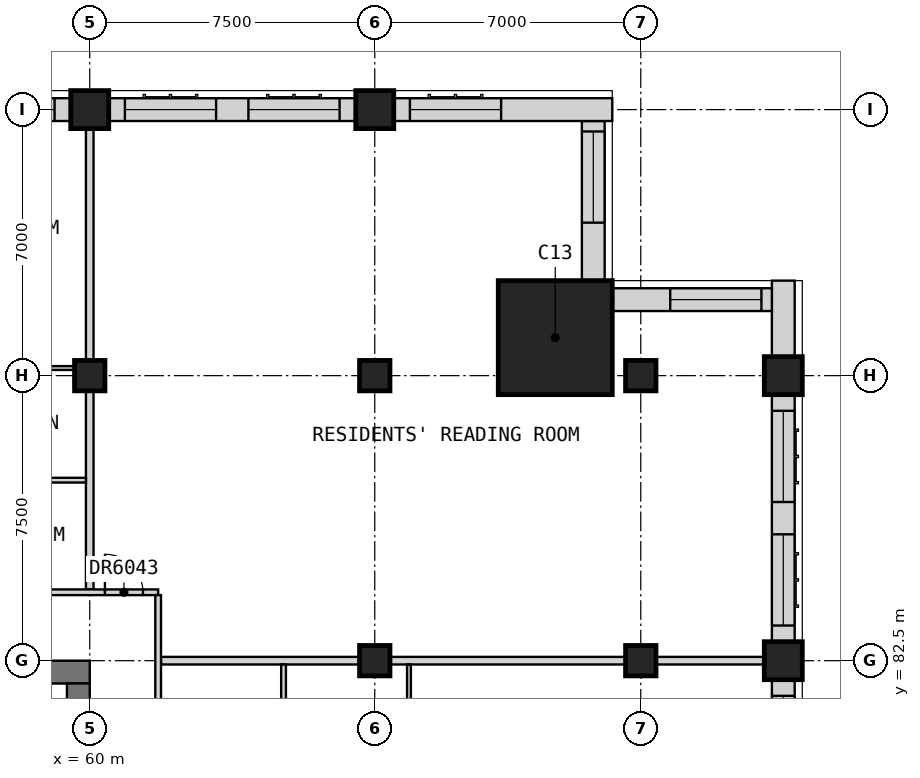
"""IFC4 building model, lengths in metres.
Left out: names, types, materials, properties, quantities, classifications, styles, units other than length and angle.
Written with IfcOpenShell. Run it as: python <this file> out.ifc"""

import sys

from ifc_helpers import new_model, si_unit, direction, frame, frame_2d, origin, origin_2d, place, context, subcontext, project, spatial, rectangle, extrude, element, fill, save


model = new_model("IFC4")
c1 = context("Model", 3, precision=1e-05, world=origin(), true_north=direction((0.0, 1.0)))
c2 = subcontext(c1, "Body", "Model", "MODEL_VIEW")
j1 = project(units=[si_unit("LENGTHUNIT", "METRE"), si_unit("PLANEANGLEUNIT", "RADIAN")], contexts=[c1])
p1 = place(None, origin())
s1 = spatial("IfcSite", under=j1, at=p1, CompositionType="ELEMENT")
p2 = place(p1, origin())
s2 = spatial("IfcBuilding", under=s1, at=p2, CompositionType="ELEMENT")
p3 = place(p2, frame((0.0, 0.0, 254.7)))
s3 = spatial("IfcBuildingStorey", under=s2, at=p3, CompositionType="ELEMENT", Elevation=254.7)
for number, where, z_axis, x_axis in (
    (1, (78.25, 82.5, 0.0), (0.0, 0.0, 1.0), (1.0, 0.0, 0.0)),
    (2, (78.25, 90.0, 0.0), (0.0, 0.0, 1.0), (1.0, 0.0, 0.0)),
):
    element("IfcColumn", number, at=place(p3, frame(where, z_axis=z_axis, x_axis=x_axis)), inside=s3, PredefinedType="COLUMN", context=c2, shape_type="SweptSolid", body=[
        extrude(rectangle(XDim=1.0, YDim=1.0, at=origin_2d()), origin(), (0.0, 0.0, 1.0), 3.5),
    ])
p4 = place(p3, frame((60.0, 90.0, 0.0), z_axis=(0.0, 0.0, 1.0), x_axis=(1.0, 0.0, 0.0)))
e3 = element("IfcColumn", 3, at=p4, inside=s3, PredefinedType="COLUMN", context=c2, shape_type="SweptSolid", body=[
    extrude(rectangle(XDim=0.8, YDim=0.8, at=origin_2d()), origin(), (0.0, 0.0, 1.0), 3.5),
])
p5 = place(p3, frame((60.0, 97.0, 0.0), z_axis=(0.0, 0.0, 1.0), x_axis=(1.0, 0.0, 0.0)))
e4 = element("IfcColumn", 4, at=p5, inside=s3, PredefinedType="COLUMN", context=c2, shape_type="SweptSolid", body=[
    extrude(rectangle(XDim=1.0, YDim=1.0, at=origin_2d()), origin(), (0.0, 0.0, 1.0), 3.5),
])
for number, where, z_axis, x_axis in (
    (5, (67.5, 82.5, 0.0), (0.0, 0.0, 1.0), (1.0, 0.0, 0.0)),
    (6, (67.5, 90.0, 0.0), (0.0, 0.0, 1.0), (1.0, 0.0, 0.0)),
):
    element("IfcColumn", number, at=place(p3, frame(where, z_axis=z_axis, x_axis=x_axis)), inside=s3, PredefinedType="COLUMN", context=c2, shape_type="SweptSolid", body=[
        extrude(rectangle(XDim=0.8, YDim=0.8, at=origin_2d()), origin(), (0.0, 0.0, 1.0), 3.5),
    ])
p6 = place(p3, frame((67.5, 97.0, 0.0), z_axis=(0.0, 0.0, 1.0), x_axis=(1.0, 0.0, 0.0)))
e7 = element("IfcColumn", 7, at=p6, inside=s3, PredefinedType="COLUMN", context=c2, shape_type="SweptSolid", body=[
    extrude(rectangle(XDim=1.0, YDim=1.0, at=origin_2d()), origin(), (0.0, 0.0, 1.0), 3.5),
])
for number, where, z_axis, x_axis in (
    (8, (74.5, 82.5, 0.0), (0.0, 0.0, 1.0), (1.0, 0.0, 0.0)),
    (9, (74.5, 90.0, 0.0), (0.0, 0.0, 1.0), (1.0, 0.0, 0.0)),
):
    element("IfcColumn", number, at=place(p3, frame(where, z_axis=z_axis, x_axis=x_axis)), inside=s3, PredefinedType="COLUMN", context=c2, shape_type="SweptSolid", body=[
        extrude(rectangle(XDim=0.8, YDim=0.8, at=origin_2d()), origin(), (0.0, 0.0, 1.0), 3.5),
    ])
p7 = place(p3, frame((72.25, 91.0, 0.0), z_axis=(0.0, 0.0, 1.0), x_axis=(1.0, 0.0, 0.0)))
e10 = element("IfcColumn", 10, at=p7, inside=s3, PredefinedType="COLUMN", context=c2, shape_type="SweptSolid", body=[
    extrude(rectangle(XDim=3.0, YDim=3.0, at=origin_2d()), origin(), (0.0, 0.0, 1.0), 3.5),
])
p8 = place(p3, frame((30.0, 82.2, 0.0), z_axis=(0.0, 0.0, 1.0), x_axis=(1.0, 0.0, 0.0)))
e11 = element("IfcWall", 11, at=p8, inside=s3, PredefinedType="SHEAR", context=c2, shape_type="SweptSolid", body=[
    extrude(rectangle(XDim=30.0, YDim=0.6, at=frame_2d((15.0, 0.0))), origin(), (0.0, 0.0, 1.0), 3.5),
])
p9 = place(p3, frame((59.7, 60.6, 0.0), z_axis=(0.0, 0.0, 1.0), x_axis=(0.0, 1.0, 0.0)))
e12 = element("IfcWall", 12, at=p9, inside=s3, PredefinedType="SHEAR", context=c2, shape_type="SweptSolid", body=[
    extrude(rectangle(XDim=21.3, YDim=0.6, at=frame_2d((10.65, 0.0))), origin(), (0.0, 0.0, 1.0), 3.5),
])
p10 = place(p9, frame((14.9, 0.0, 0.0)))
e13 = element("IfcOpeningElement", 13, at=p10, cuts=e12, PredefinedType="OPENING", context=c2, shape_type="SweptSolid", body=[
    extrude(rectangle(XDim=1.8, YDim=2.1, at=frame_2d((0.9, 1.05))), frame((0.0, 0.31, 0.0), z_axis=(0.0, -1.0, 0.0), x_axis=(1.0, 0.0, 0.0)), (0.0, 0.0, 1.0), 0.62),
])
p11 = place(p3, frame((78.25, 75.5, 0.0), z_axis=(0.0, 0.0, 1.0), x_axis=(0.0, 1.0, 0.0)))
e14 = element("IfcWall", 14, at=p11, inside=s3, PredefinedType="SOLIDWALL", context=c2, shape_type="SweptSolid", body=[
    extrude(rectangle(XDim=6.5, YDim=0.6, at=frame_2d((3.25, 0.0))), origin(), (0.0, 0.0, 1.0), 2.75),
])
p12 = place(p11, frame((0.425, 0.0, 0.8)))
e15 = element("IfcOpeningElement", 15, at=p12, cuts=e14, PredefinedType="OPENING", context=c2, shape_type="SweptSolid", body=[
    extrude(rectangle(XDim=2.4, YDim=1.8, at=frame_2d((1.2, 0.9))), frame((0.0, 0.31, 0.0), z_axis=(0.0, -1.0, 0.0), x_axis=(1.0, 0.0, 0.0)), (0.0, 0.0, 1.0), 0.62),
])
p13 = place(p11, frame((3.675, 0.0, 0.8)))
e16 = element("IfcOpeningElement", 16, at=p13, cuts=e14, PredefinedType="OPENING", context=c2, shape_type="SweptSolid", body=[
    extrude(rectangle(XDim=2.4, YDim=1.8, at=frame_2d((1.2, 0.9))), frame((0.0, 0.31, 0.0), z_axis=(0.0, -1.0, 0.0), x_axis=(1.0, 0.0, 0.0)), (0.0, 0.0, 1.0), 0.62),
])
p14 = place(p3, frame((78.25, 83.0, 0.0), z_axis=(0.0, 0.0, 1.0), x_axis=(0.0, 1.0, 0.0)))
e17 = element("IfcWall", 17, at=p14, inside=s3, PredefinedType="SOLIDWALL", context=c2, shape_type="SweptSolid", body=[
    extrude(rectangle(XDim=6.5, YDim=0.6, at=frame_2d((3.25, 0.0))), origin(), (0.0, 0.0, 1.0), 2.75),
])
p15 = place(p14, frame((0.425, 0.0, 0.8)))
e18 = element("IfcOpeningElement", 18, at=p15, cuts=e17, PredefinedType="OPENING", context=c2, shape_type="SweptSolid", body=[
    extrude(rectangle(XDim=2.4, YDim=1.8, at=frame_2d((1.2, 0.9))), frame((0.0, 0.31, 0.0), z_axis=(0.0, -1.0, 0.0), x_axis=(1.0, 0.0, 0.0)), (0.0, 0.0, 1.0), 0.62),
])
p16 = place(p14, frame((3.675, 0.0, 0.8)))
e19 = element("IfcOpeningElement", 19, at=p16, cuts=e17, PredefinedType="OPENING", context=c2, shape_type="SweptSolid", body=[
    extrude(rectangle(XDim=2.4, YDim=1.8, at=frame_2d((1.2, 0.9))), frame((0.0, 0.31, 0.0), z_axis=(0.0, -1.0, 0.0), x_axis=(1.0, 0.0, 0.0)), (0.0, 0.0, 1.0), 0.62),
])
p17 = place(p3, frame((78.25, 90.5, 0.0), z_axis=(0.0, 0.0, 1.0), x_axis=(0.0, 1.0, 0.0)))
e20 = element("IfcWall", 20, at=p17, inside=s3, PredefinedType="SOLIDWALL", context=c2, shape_type="SweptSolid", body=[
    extrude(rectangle(XDim=2.0, YDim=0.6, at=frame_2d((1.0, 0.0))), origin(), (0.0, 0.0, 1.0), 3.1),
])
p18 = place(p3, frame((77.95, 92.0, 0.0), z_axis=(0.0, 0.0, 1.0), x_axis=(-1.0, 0.0, 0.0)))
e21 = element("IfcWall", 21, at=p18, inside=s3, PredefinedType="SOLIDWALL", context=c2, shape_type="SweptSolid", body=[
    extrude(rectangle(XDim=4.2, YDim=0.6, at=frame_2d((2.1, 0.0))), origin(), (0.0, 0.0, 1.0), 3.1),
])
p19 = place(p18, frame((0.275, 0.0, 0.8)))
e22 = element("IfcOpeningElement", 22, at=p19, cuts=e21, PredefinedType="OPENING", context=c2, shape_type="SweptSolid", body=[
    extrude(rectangle(XDim=2.4, YDim=1.8, at=frame_2d((1.2, 0.9))), frame((0.0, 0.31, 0.0), z_axis=(0.0, -1.0, 0.0), x_axis=(1.0, 0.0, 0.0)), (0.0, 0.0, 1.0), 0.62),
])
p20 = place(p3, frame((73.25, 92.5, 0.0), z_axis=(0.0, 0.0, 1.0), x_axis=(0.0, 1.0, 0.0)))
e23 = element("IfcWall", 23, at=p20, inside=s3, PredefinedType="SOLIDWALL", context=c2, shape_type="SweptSolid", body=[
    extrude(rectangle(XDim=4.2, YDim=0.6, at=frame_2d((2.1, 0.0))), origin(), (0.0, 0.0, 1.0), 3.1),
])
p21 = place(p20, frame((1.525, 0.0, 0.8)))
e24 = element("IfcOpeningElement", 24, at=p21, cuts=e23, PredefinedType="OPENING", context=c2, shape_type="SweptSolid", body=[
    extrude(rectangle(XDim=2.4, YDim=1.8, at=frame_2d((1.2, 0.9))), frame((0.0, 0.31, 0.0), z_axis=(0.0, -1.0, 0.0), x_axis=(1.0, 0.0, 0.0)), (0.0, 0.0, 1.0), 0.62),
])
p22 = place(p3, frame((73.75, 97.0, 0.0), z_axis=(0.0, 0.0, 1.0), x_axis=(-1.0, 0.0, 0.0)))
e25 = element("IfcWall", 25, at=p22, inside=s3, PredefinedType="SOLIDWALL", context=c2, shape_type="SweptSolid", body=[
    extrude(rectangle(XDim=5.75, YDim=0.6, at=frame_2d((2.875, 0.0))), origin(), (0.0, 0.0, 1.0), 3.1),
])
p23 = place(p22, frame((2.925, 0.0, 0.8)))
e26 = element("IfcOpeningElement", 26, at=p23, cuts=e25, PredefinedType="OPENING", context=c2, shape_type="SweptSolid", body=[
    extrude(rectangle(XDim=2.4, YDim=1.8, at=frame_2d((1.2, 0.9))), frame((0.0, 0.31, 0.0), z_axis=(0.0, -1.0, 0.0), x_axis=(1.0, 0.0, 0.0)), (0.0, 0.0, 1.0), 0.62),
])
p24 = place(p3, frame((67.0, 97.0, 0.0), z_axis=(0.0, 0.0, 1.0), x_axis=(-1.0, 0.0, 0.0)))
e27 = element("IfcWall", 27, at=p24, inside=s3, PredefinedType="SOLIDWALL", context=c2, shape_type="SweptSolid", body=[
    extrude(rectangle(XDim=6.5, YDim=0.6, at=frame_2d((3.25, 0.0))), origin(), (0.0, 0.0, 1.0), 2.75),
])
p25 = place(p24, frame((3.675, 0.0, 0.8)))
e28 = element("IfcOpeningElement", 28, at=p25, cuts=e27, PredefinedType="OPENING", context=c2, shape_type="SweptSolid", body=[
    extrude(rectangle(XDim=2.4, YDim=1.8, at=frame_2d((1.2, 0.9))), frame((0.0, 0.31, 0.0), z_axis=(0.0, -1.0, 0.0), x_axis=(1.0, 0.0, 0.0)), (0.0, 0.0, 1.0), 0.62),
])
p26 = place(p24, frame((0.425, 0.0, 0.8)))
e29 = element("IfcOpeningElement", 29, at=p26, cuts=e27, PredefinedType="OPENING", context=c2, shape_type="SweptSolid", body=[
    extrude(rectangle(XDim=2.4, YDim=1.8, at=frame_2d((1.2, 0.9))), frame((0.0, 0.31, 0.0), z_axis=(0.0, -1.0, 0.0), x_axis=(1.0, 0.0, 0.0)), (0.0, 0.0, 1.0), 0.62),
])
p27 = place(p3, frame((59.5, 97.0, 0.0), z_axis=(0.0, 0.0, 1.0), x_axis=(-1.0, 0.0, 0.0)))
e30 = element("IfcWall", 30, at=p27, inside=s3, PredefinedType="SOLIDWALL", context=c2, shape_type="SweptSolid", body=[
    extrude(rectangle(XDim=6.5, YDim=0.6, at=frame_2d((3.25, 0.0))), origin(), (0.0, 0.0, 1.0), 2.75),
])
p28 = place(p27, frame((3.675, 0.0, 0.8)))
e31 = element("IfcOpeningElement", 31, at=p28, cuts=e30, PredefinedType="OPENING", context=c2, shape_type="SweptSolid", body=[
    extrude(rectangle(XDim=2.4, YDim=1.8, at=frame_2d((1.2, 0.9))), frame((0.0, 0.31, 0.0), z_axis=(0.0, -1.0, 0.0), x_axis=(1.0, 0.0, 0.0)), (0.0, 0.0, 1.0), 0.62),
])
p29 = place(p27, frame((0.425, 0.0, 0.8)))
e32 = element("IfcOpeningElement", 32, at=p29, cuts=e30, PredefinedType="OPENING", context=c2, shape_type="SweptSolid", body=[
    extrude(rectangle(XDim=2.4, YDim=1.8, at=frame_2d((1.2, 0.9))), frame((0.0, 0.31, 0.0), z_axis=(0.0, -1.0, 0.0), x_axis=(1.0, 0.0, 0.0)), (0.0, 0.0, 1.0), 0.62),
])
p30 = place(p3, frame((61.875, 82.5, 0.0), z_axis=(0.0, 0.0, 1.0), x_axis=(1.0, 0.0, 0.0)))
e33 = element("IfcWall", 33, at=p30, inside=s3, PredefinedType="PARTITIONING", context=c2, shape_type="SweptSolid", body=[
    extrude(rectangle(XDim=16.875, YDim=0.2, at=frame_2d((8.438, 0.0))), origin(), (0.0, 0.0, 1.0), 3.1),
])
p31 = place(p3, frame((60.0, 84.375, 0.0), z_axis=(0.0, 0.0, 1.0), x_axis=(0.0, 1.0, 0.0)))
e34 = element("IfcWall", 34, at=p31, inside=s3, PredefinedType="PARTITIONING", context=c2, shape_type="SweptSolid", body=[
    extrude(rectangle(XDim=13.125, YDim=0.2, at=frame_2d((6.562, 0.0))), origin(), (0.0, 0.0, 1.0), 3.1),
])
p32 = place(p3, frame((33.75, 84.3, 0.0), z_axis=(0.0, 0.0, 1.0), x_axis=(1.0, 0.0, 0.0)))
e35 = element("IfcWall", 35, at=p32, inside=s3, PredefinedType="PARTITIONING", context=c2, shape_type="SweptSolid", body=[
    extrude(rectangle(XDim=28.05, YDim=0.15, at=frame_2d((14.025, 0.0))), origin(), (0.0, 0.0, 1.0), 3.1),
])
p33 = place(p32, frame((12.675, 0.0, 0.0)))
e36 = element("IfcOpeningElement", 36, at=p33, cuts=e35, PredefinedType="OPENING", context=c2, shape_type="SweptSolid", body=[
    extrude(rectangle(XDim=0.9, YDim=2.1, at=frame_2d((0.45, 1.05))), frame((0.0, 0.085, 0.0), z_axis=(0.0, -1.0, 0.0), x_axis=(1.0, 0.0, 0.0)), (0.0, 0.0, 1.0), 0.17),
])
p34 = place(p32, frame((20.175, 0.0, 0.0)))
e37 = element("IfcOpeningElement", 37, at=p34, cuts=e35, PredefinedType="OPENING", context=c2, shape_type="SweptSolid", body=[
    extrude(rectangle(XDim=0.9, YDim=2.1, at=frame_2d((0.45, 1.05))), frame((0.0, 0.085, 0.0), z_axis=(0.0, -1.0, 0.0), x_axis=(1.0, 0.0, 0.0)), (0.0, 0.0, 1.0), 0.17),
])
p35 = place(p32, frame((26.65, 0.0, 0.0)))
e38 = element("IfcOpeningElement", 38, at=p35, cuts=e35, PredefinedType="OPENING", context=c2, shape_type="SweptSolid", body=[
    extrude(rectangle(XDim=1.0, YDim=2.1, at=frame_2d((0.5, 1.05))), frame((0.0, 0.085, 0.0), z_axis=(0.0, -1.0, 0.0), x_axis=(1.0, 0.0, 0.0)), (0.0, 0.0, 1.0), 0.17),
])
p36 = place(p3, frame((61.8, 58.275, 0.0), z_axis=(0.0, 0.0, 1.0), x_axis=(0.0, 1.0, 0.0)))
e39 = element("IfcWall", 39, at=p36, inside=s3, PredefinedType="PARTITIONING", context=c2, shape_type="SweptSolid", body=[
    extrude(rectangle(XDim=25.95, YDim=0.15, at=frame_2d((12.975, 0.0))), origin(), (0.0, 0.0, 1.0), 3.1),
])
p37 = place(p36, frame((4.575, 0.0, 0.0)))
e40 = element("IfcOpeningElement", 40, at=p37, cuts=e39, PredefinedType="OPENING", context=c2, shape_type="SweptSolid", body=[
    extrude(rectangle(XDim=1.8, YDim=2.1, at=frame_2d((0.9, 1.05))), frame((0.0, 0.085, 0.0), z_axis=(0.0, -1.0, 0.0), x_axis=(1.0, 0.0, 0.0)), (0.0, 0.0, 1.0), 0.17),
])
p38 = place(p36, frame((10.65, 0.0, 0.0)))
e41 = element("IfcOpeningElement", 41, at=p38, cuts=e39, PredefinedType="OPENING", context=c2, shape_type="SweptSolid", body=[
    extrude(rectangle(XDim=0.9, YDim=2.1, at=frame_2d((0.45, 1.05))), frame((0.0, 0.085, 0.0), z_axis=(0.0, -1.0, 0.0), x_axis=(1.0, 0.0, 0.0)), (0.0, 0.0, 1.0), 0.17),
])
p39 = place(p36, frame((18.15, 0.0, 0.0)))
e42 = element("IfcOpeningElement", 42, at=p39, cuts=e39, PredefinedType="OPENING", context=c2, shape_type="SweptSolid", body=[
    extrude(rectangle(XDim=0.9, YDim=2.1, at=frame_2d((0.45, 1.05))), frame((0.0, 0.085, 0.0), z_axis=(0.0, -1.0, 0.0), x_axis=(1.0, 0.0, 0.0)), (0.0, 0.0, 1.0), 0.17),
])
p40 = place(p3, frame((30.0, 90.2, 0.0), z_axis=(0.0, 0.0, 1.0), x_axis=(1.0, 0.0, 0.0)))
e43 = element("IfcWall", 43, at=p40, inside=s3, PredefinedType="PARTITIONING", context=c2, shape_type="SweptSolid", body=[
    extrude(rectangle(XDim=29.9, YDim=0.1, at=frame_2d((14.95, 0.0))), origin(), (0.0, 0.0, 1.0), 2.75),
])
p41 = place(p40, frame((1.425, 0.0, 0.0)))
e44 = element("IfcOpeningElement", 44, at=p41, cuts=e43, PredefinedType="OPENING", context=c2, shape_type="SweptSolid", body=[
    extrude(rectangle(XDim=0.9, YDim=2.1, at=frame_2d((0.45, 1.05))), frame((0.0, 0.06, 0.0), z_axis=(0.0, -1.0, 0.0), x_axis=(1.0, 0.0, 0.0)), (0.0, 0.0, 1.0), 0.12),
])
p42 = place(p40, frame((8.925, 0.0, 0.0)))
e45 = element("IfcOpeningElement", 45, at=p42, cuts=e43, PredefinedType="OPENING", context=c2, shape_type="SweptSolid", body=[
    extrude(rectangle(XDim=0.9, YDim=2.1, at=frame_2d((0.45, 1.05))), frame((0.0, 0.06, 0.0), z_axis=(0.0, -1.0, 0.0), x_axis=(1.0, 0.0, 0.0)), (0.0, 0.0, 1.0), 0.12),
])
p43 = place(p40, frame((12.675, 0.0, 0.0)))
e46 = element("IfcOpeningElement", 46, at=p43, cuts=e43, PredefinedType="OPENING", context=c2, shape_type="SweptSolid", body=[
    extrude(rectangle(XDim=0.9, YDim=2.1, at=frame_2d((0.45, 1.05))), frame((0.0, 0.06, 0.0), z_axis=(0.0, -1.0, 0.0), x_axis=(1.0, 0.0, 0.0)), (0.0, 0.0, 1.0), 0.12),
])
p44 = place(p40, frame((16.425, 0.0, 0.0)))
e47 = element("IfcOpeningElement", 47, at=p44, cuts=e43, PredefinedType="OPENING", context=c2, shape_type="SweptSolid", body=[
    extrude(rectangle(XDim=0.9, YDim=2.1, at=frame_2d((0.45, 1.05))), frame((0.0, 0.06, 0.0), z_axis=(0.0, -1.0, 0.0), x_axis=(1.0, 0.0, 0.0)), (0.0, 0.0, 1.0), 0.12),
])
p45 = place(p40, frame((23.925, 0.0, 0.0)))
e48 = element("IfcOpeningElement", 48, at=p45, cuts=e43, PredefinedType="OPENING", context=c2, shape_type="SweptSolid", body=[
    extrude(rectangle(XDim=0.9, YDim=2.1, at=frame_2d((0.45, 1.05))), frame((0.0, 0.06, 0.0), z_axis=(0.0, -1.0, 0.0), x_axis=(1.0, 0.0, 0.0)), (0.0, 0.0, 1.0), 0.12),
])
p46 = place(p3, frame((68.4, 67.6, 0.0), z_axis=(0.0, 0.0, 1.0), x_axis=(0.0, 1.0, 0.0)))
e49 = element("IfcWall", 49, at=p46, inside=s3, PredefinedType="PARTITIONING", context=c2, shape_type="SweptSolid", body=[
    extrude(rectangle(XDim=14.8, YDim=0.1, at=frame_2d((7.4, 0.0))), origin(), (0.0, 0.0, 1.0), 3.1),
])
p47 = place(p46, frame((1.325, 0.0, 0.0)))
e50 = element("IfcOpeningElement", 50, at=p47, cuts=e49, PredefinedType="OPENING", context=c2, shape_type="SweptSolid", body=[
    extrude(rectangle(XDim=0.9, YDim=2.1, at=frame_2d((0.45, 1.05))), frame((0.0, 0.06, 0.0), z_axis=(0.0, -1.0, 0.0), x_axis=(1.0, 0.0, 0.0)), (0.0, 0.0, 1.0), 0.12),
])
p48 = place(p46, frame((8.825, 0.0, 0.0)))
e51 = element("IfcOpeningElement", 51, at=p48, cuts=e49, PredefinedType="OPENING", context=c2, shape_type="SweptSolid", body=[
    extrude(rectangle(XDim=0.9, YDim=2.1, at=frame_2d((0.45, 1.05))), frame((0.0, 0.06, 0.0), z_axis=(0.0, -1.0, 0.0), x_axis=(1.0, 0.0, 0.0)), (0.0, 0.0, 1.0), 0.12),
])
p49 = place(p3, frame((56.25, 87.25, 0.0), z_axis=(0.0, 0.0, 1.0), x_axis=(1.0, 0.0, 0.0)))
e52 = element("IfcWall", 52, at=p49, inside=s3, PredefinedType="PARTITIONING", context=c2, shape_type="SweptSolid", body=[
    extrude(rectangle(XDim=3.65, YDim=0.125, at=frame_2d((1.825, 0.0))), origin(), (0.0, 0.0, 1.0), 3.1),
])
p50 = place(p3, frame((65.1, 78.812, 0.0), z_axis=(0.0, 0.0, 1.0), x_axis=(0.0, 1.0, 0.0)))
e53 = element("IfcWall", 53, at=p50, inside=s3, PredefinedType="PARTITIONING", context=c2, shape_type="SweptSolid", body=[
    extrude(rectangle(XDim=3.587, YDim=0.125, at=frame_2d((1.794, 0.0))), origin(), (0.0, 0.0, 1.0), 3.1),
])
p51 = place(p13, origin())
e54 = element("IfcWindow", 54, at=p51, inside=s3, PartitioningType="SINGLE_PANEL", PredefinedType="WINDOW", context=c2, shape_type="SweptSolid", body=[
    extrude(rectangle(XDim=2.4, YDim=1.8, at=frame_2d((1.2, 0.9))), frame((0.0, -0.07, 0.0), z_axis=(0.0, -1.0, 0.0), x_axis=(1.0, 0.0, 0.0)), (0.0, 0.0, 1.0), 0.06),
])
fill(e16, e54)
p52 = place(p15, origin())
e55 = element("IfcWindow", 55, at=p52, inside=s3, PartitioningType="SINGLE_PANEL", PredefinedType="WINDOW", context=c2, shape_type="SweptSolid", body=[
    extrude(rectangle(XDim=2.4, YDim=1.8, at=frame_2d((1.2, 0.9))), frame((0.0, -0.07, 0.0), z_axis=(0.0, -1.0, 0.0), x_axis=(1.0, 0.0, 0.0)), (0.0, 0.0, 1.0), 0.06),
])
fill(e18, e55)
p53 = place(p16, origin())
e56 = element("IfcWindow", 56, at=p53, inside=s3, PartitioningType="SINGLE_PANEL", PredefinedType="WINDOW", context=c2, shape_type="SweptSolid", body=[
    extrude(rectangle(XDim=2.4, YDim=1.8, at=frame_2d((1.2, 0.9))), frame((0.0, -0.07, 0.0), z_axis=(0.0, -1.0, 0.0), x_axis=(1.0, 0.0, 0.0)), (0.0, 0.0, 1.0), 0.06),
])
fill(e19, e56)
p54 = place(p19, origin())
e57 = element("IfcWindow", 57, at=p54, inside=s3, PartitioningType="SINGLE_PANEL", PredefinedType="WINDOW", context=c2, shape_type="SweptSolid", body=[
    extrude(rectangle(XDim=2.4, YDim=1.8, at=frame_2d((1.2, 0.9))), frame((0.0, -0.07, 0.0), z_axis=(0.0, -1.0, 0.0), x_axis=(1.0, 0.0, 0.0)), (0.0, 0.0, 1.0), 0.06),
])
fill(e22, e57)
p55 = place(p21, origin())
e58 = element("IfcWindow", 58, at=p55, inside=s3, PartitioningType="SINGLE_PANEL", PredefinedType="WINDOW", context=c2, shape_type="SweptSolid", body=[
    extrude(rectangle(XDim=2.4, YDim=1.8, at=frame_2d((1.2, 0.9))), frame((0.0, -0.07, 0.0), z_axis=(0.0, -1.0, 0.0), x_axis=(1.0, 0.0, 0.0)), (0.0, 0.0, 1.0), 0.06),
])
fill(e24, e58)
p56 = place(p23, origin())
e59 = element("IfcWindow", 59, at=p56, inside=s3, PartitioningType="SINGLE_PANEL", PredefinedType="WINDOW", context=c2, shape_type="SweptSolid", body=[
    extrude(rectangle(XDim=2.4, YDim=1.8, at=frame_2d((1.2, 0.9))), frame((0.0, -0.07, 0.0), z_axis=(0.0, -1.0, 0.0), x_axis=(1.0, 0.0, 0.0)), (0.0, 0.0, 1.0), 0.06),
])
fill(e26, e59)
p57 = place(p25, origin())
e60 = element("IfcWindow", 60, at=p57, inside=s3, PartitioningType="SINGLE_PANEL", PredefinedType="WINDOW", context=c2, shape_type="SweptSolid", body=[
    extrude(rectangle(XDim=2.4, YDim=1.8, at=frame_2d((1.2, 0.9))), frame((0.0, -0.07, 0.0), z_axis=(0.0, -1.0, 0.0), x_axis=(1.0, 0.0, 0.0)), (0.0, 0.0, 1.0), 0.06),
])
fill(e28, e60)
p58 = place(p26, origin())
e61 = element("IfcWindow", 61, at=p58, inside=s3, PartitioningType="SINGLE_PANEL", PredefinedType="WINDOW", context=c2, shape_type="SweptSolid", body=[
    extrude(rectangle(XDim=2.4, YDim=1.8, at=frame_2d((1.2, 0.9))), frame((0.0, -0.07, 0.0), z_axis=(0.0, -1.0, 0.0), x_axis=(1.0, 0.0, 0.0)), (0.0, 0.0, 1.0), 0.06),
])
fill(e29, e61)
p59 = place(p29, origin())
e62 = element("IfcWindow", 62, at=p59, inside=s3, PartitioningType="SINGLE_PANEL", PredefinedType="WINDOW", context=c2, shape_type="SweptSolid", body=[
    extrude(rectangle(XDim=2.4, YDim=1.8, at=frame_2d((1.2, 0.9))), frame((0.0, -0.07, 0.0), z_axis=(0.0, -1.0, 0.0), x_axis=(1.0, 0.0, 0.0)), (0.0, 0.0, 1.0), 0.06),
])
fill(e32, e62)
p60 = place(p35, origin())
e63 = element("IfcDoor", 63, at=p60, inside=s3, OperationType="SINGLE_SWING_LEFT", PredefinedType="DOOR", context=c2, shape_type="SweptSolid", body=[
    extrude(rectangle(XDim=1.0, YDim=2.1, at=frame_2d((0.5, 1.05))), frame((0.0, 0.025, 0.0), z_axis=(0.0, -1.0, 0.0), x_axis=(1.0, 0.0, 0.0)), (0.0, 0.0, 1.0), 0.05),
])
fill(e38, e63)
save(model, sys.argv[1])
